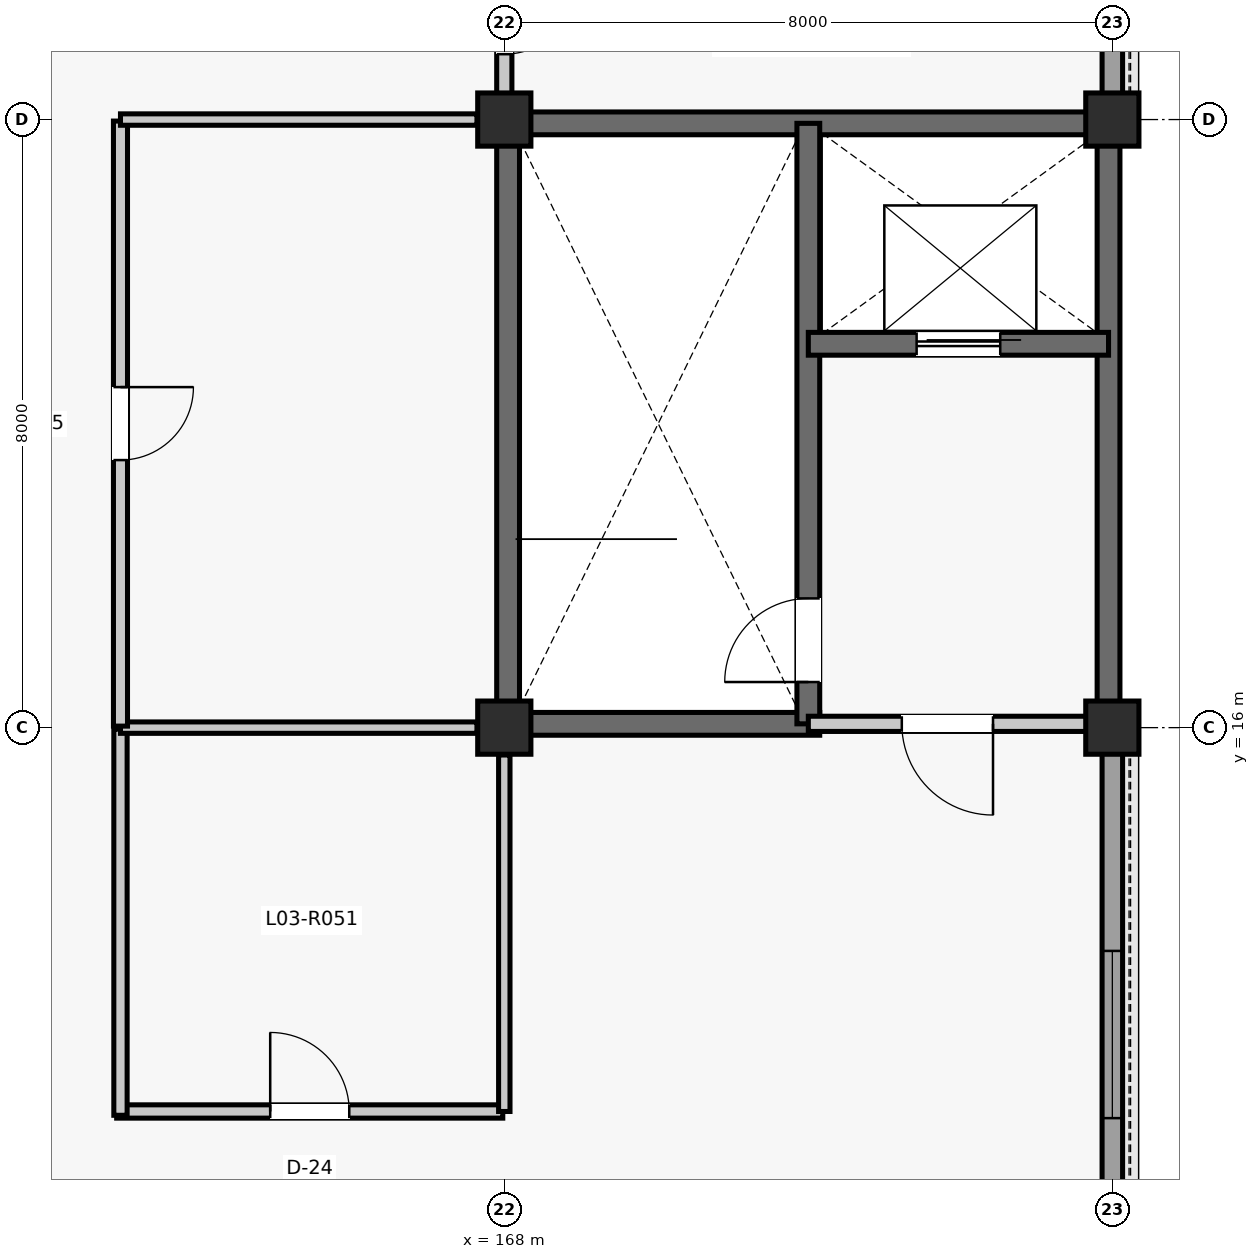
"""IFC4 building model, lengths in metres.
Left out: names, types, materials, properties, quantities, classifications, styles, units other than length and angle.
Written with IfcOpenShell. Run it as: python <this file> out.ifc"""

import sys

from ifc_helpers import new_model, si_unit, direction, frame, frame_2d, origin, origin_2d, place, context, subcontext, project, spatial, rectangle, extrude, element, fill, save


model = new_model("IFC4")
c1 = context("Model", 3, precision=1e-05, world=origin(), true_north=direction((0.0, 1.0)))
c2 = subcontext(c1, "Body", "Model", "MODEL_VIEW")
j1 = project(units=[si_unit("LENGTHUNIT", "METRE"), si_unit("PLANEANGLEUNIT", "RADIAN")], contexts=[c1])
p1 = place(None, origin())
s1 = spatial("IfcSite", under=j1, at=p1, CompositionType="ELEMENT")
p2 = place(p1, origin())
s2 = spatial("IfcBuilding", under=s1, at=p2, CompositionType="ELEMENT")
p3 = place(p2, frame((0.0, 0.0, 13.86)))
s3 = spatial("IfcBuildingStorey", under=s2, at=p3, CompositionType="ELEMENT", Elevation=13.86)
for number, where, z_axis, x_axis in (
    (1, (168.0, 16.0, 0.0), (0.0, 0.0, 1.0), (1.0, 0.0, 0.0)),
    (2, (168.0, 24.0, 0.0), (0.0, 0.0, 1.0), (1.0, 0.0, 0.0)),
    (3, (176.0, 16.0, 0.0), (0.0, 0.0, 1.0), (1.0, 0.0, 0.0)),
    (4, (176.0, 24.0, 0.0), (0.0, 0.0, 1.0), (1.0, 0.0, 0.0)),
):
    element("IfcColumn", number, at=place(p3, frame(where, z_axis=z_axis, x_axis=x_axis)), inside=s3, PredefinedType="COLUMN", context=c2, shape_type="SweptSolid", body=[
        extrude(rectangle(XDim=0.7, YDim=0.7, at=origin_2d()), origin(), (0.0, 0.0, 1.0), 3.96),
    ])
p4 = place(p3, frame((176.0, 8.26, 0.0), z_axis=(0.0, 0.0, 1.0), x_axis=(0.0, 1.0, 0.0)))
e5 = element("IfcWall", 5, at=p4, inside=s3, PredefinedType="SOLIDWALL", context=c2, shape_type="SweptSolid", body=[
    extrude(rectangle(XDim=7.405, YDim=0.27, at=frame_2d((3.703, 0.0))), origin(), (0.0, 0.0, 1.0), 3.299),
])
p5 = place(p4, frame((2.603, 0.0, 1.35)))
e6 = element("IfcOpeningElement", 6, at=p5, cuts=e5, PredefinedType="OPENING", context=c2, shape_type="SweptSolid", body=[
    extrude(rectangle(XDim=2.2, YDim=1.3, at=frame_2d((1.1, 0.65))), frame((0.0, 0.145, 0.0), z_axis=(0.0, -1.0, 0.0), x_axis=(1.0, 0.0, 0.0)), (0.0, 0.0, 1.0), 0.29),
])
p6 = place(p3, frame((176.0, 24.335, 0.0), z_axis=(0.0, 0.0, 1.0), x_axis=(0.0, 1.0, 0.0)))
e7 = element("IfcWall", 7, at=p6, inside=s3, PredefinedType="SOLIDWALL", context=c2, shape_type="SweptSolid", body=[
    extrude(rectangle(XDim=7.405, YDim=0.27, at=frame_2d((3.703, 0.0))), origin(), (0.0, 0.0, 1.0), 3.295),
])
p7 = place(p6, frame((2.603, 0.0, 1.35)))
e8 = element("IfcOpeningElement", 8, at=p7, cuts=e7, PredefinedType="OPENING", context=c2, shape_type="SweptSolid", body=[
    extrude(rectangle(XDim=2.2, YDim=1.3, at=frame_2d((1.1, 0.65))), frame((0.0, 0.145, 0.0), z_axis=(0.0, -1.0, 0.0), x_axis=(1.0, 0.0, 0.0)), (0.0, 0.0, 1.0), 0.29),
])
for number, where, z_axis, x_axis in (
    (9, (168.05, 16.24, 0.0), (0.0, 0.0, 1.0), (0.0, 1.0, 0.0)),
    (10, (168.24, 23.95, 0.0), (0.0, 0.0, 1.0), (1.0, 0.0, 0.0)),
    (11, (175.95, 16.24, 0.0), (0.0, 0.0, 1.0), (0.0, 1.0, 0.0)),
):
    element("IfcWall", number, at=place(p3, frame(where, z_axis=z_axis, x_axis=x_axis)), inside=s3, PredefinedType="SHEAR", context=c2, shape_type="SweptSolid", body=[
        extrude(rectangle(XDim=7.52, YDim=0.3, at=frame_2d((3.76, 0.0))), origin(), (0.0, 0.0, 1.0), 3.725),
    ])
p8 = place(p3, frame((168.24, 16.05, 0.0), z_axis=(0.0, 0.0, 1.0), x_axis=(1.0, 0.0, 0.0)))
e12 = element("IfcWall", 12, at=p8, inside=s3, PredefinedType="SHEAR", context=c2, shape_type="SweptSolid", body=[
    extrude(rectangle(XDim=3.91, YDim=0.3, at=frame_2d((1.955, 0.0))), origin(), (0.0, 0.0, 1.0), 3.725),
])
p9 = place(p3, frame((172.0, 16.05, 0.0), z_axis=(0.0, 0.0, 1.0), x_axis=(0.0, 1.0, 0.0)))
e13 = element("IfcWall", 13, at=p9, inside=s3, PredefinedType="SHEAR", context=c2, shape_type="SweptSolid", body=[
    extrude(rectangle(XDim=7.9, YDim=0.3, at=frame_2d((3.95, 0.0))), origin(), (0.0, 0.0, 1.0), 3.725),
])
p10 = place(p9, frame((0.55, 0.0, 0.0)))
e14 = element("IfcOpeningElement", 14, at=p10, cuts=e13, PredefinedType="OPENING", context=c2, shape_type="SweptSolid", body=[
    extrude(rectangle(XDim=1.1, YDim=2.15, at=frame_2d((0.55, 1.075))), frame((0.0, 0.16, 0.0), z_axis=(0.0, -1.0, 0.0), x_axis=(1.0, 0.0, 0.0)), (0.0, 0.0, 1.0), 0.32),
])
p11 = place(p3, frame((172.0, 21.05, 0.0), z_axis=(0.0, 0.0, 1.0), x_axis=(1.0, 0.0, 0.0)))
e15 = element("IfcWall", 15, at=p11, inside=s3, PredefinedType="SHEAR", context=c2, shape_type="SweptSolid", body=[
    extrude(rectangle(XDim=3.95, YDim=0.3, at=frame_2d((1.975, 0.0))), origin(), (0.0, 0.0, 1.0), 3.725),
])
p12 = place(p11, frame((1.425, 0.0, 0.0)))
e16 = element("IfcOpeningElement", 16, at=p12, cuts=e15, PredefinedType="OPENING", context=c2, shape_type="SweptSolid", body=[
    extrude(rectangle(XDim=1.1, YDim=2.2, at=frame_2d((0.55, 1.1))), frame((0.0, 0.16, 0.0), z_axis=(0.0, -1.0, 0.0), x_axis=(1.0, 0.0, 0.0)), (0.0, 0.0, 1.0), 0.32),
])
p13 = place(p3, frame((172.0, 16.05, 0.0), z_axis=(0.0, 0.0, 1.0), x_axis=(1.0, 0.0, 0.0)))
e17 = element("IfcWall", 17, at=p13, inside=s3, PredefinedType="PARTITIONING", context=c2, shape_type="SweptSolid", body=[
    extrude(rectangle(XDim=3.66, YDim=0.2, at=frame_2d((1.83, 0.0))), origin(), (0.0, 0.0, 1.0), 3.447),
])
p14 = place(p13, frame((1.23, 0.0, 0.0)))
e18 = element("IfcOpeningElement", 18, at=p14, cuts=e17, PredefinedType="OPENING", context=c2, shape_type="SweptSolid", body=[
    extrude(rectangle(XDim=1.2, YDim=2.15, at=frame_2d((0.6, 1.075))), frame((0.0, 0.11, 0.0), z_axis=(0.0, -1.0, 0.0), x_axis=(1.0, 0.0, 0.0)), (0.0, 0.0, 1.0), 0.22),
])
p15 = place(p3, frame((162.9, 10.95, 0.0), z_axis=(0.0, 0.0, 1.0), x_axis=(1.0, 0.0, 0.0)))
e19 = element("IfcWall", 19, at=p15, inside=s3, PredefinedType="PARTITIONING", context=c2, shape_type="SweptSolid", body=[
    extrude(rectangle(XDim=5.08, YDim=0.175, at=frame_2d((2.54, 0.0))), origin(), (0.0, 0.0, 1.0), 3.248),
])
p16 = place(p15, frame((2.02, 0.0, 0.0)))
e20 = element("IfcOpeningElement", 20, at=p16, cuts=e19, PredefinedType="OPENING", context=c2, shape_type="SweptSolid", body=[
    extrude(rectangle(XDim=1.04, YDim=2.18, at=frame_2d((0.52, 1.09))), frame((0.0, 0.097, 0.0), z_axis=(0.0, -1.0, 0.0), x_axis=(1.0, 0.0, 0.0)), (0.0, 0.0, 1.0), 0.195),
])
p17 = place(p3, frame((162.95, 10.9, 0.0), z_axis=(0.0, 0.0, 1.0), x_axis=(0.0, 1.0, 0.0)))
e21 = element("IfcWall", 21, at=p17, inside=s3, PredefinedType="PARTITIONING", context=c2, shape_type="SweptSolid", body=[
    extrude(rectangle(XDim=5.08, YDim=0.175, at=frame_2d((2.54, 0.0))), origin(), (0.0, 0.0, 1.0), 3.236),
])
p18 = place(p3, frame((162.95, 16.0, 0.0), z_axis=(0.0, 0.0, 1.0), x_axis=(1.0, 0.0, 0.0)))
e22 = element("IfcWall", 22, at=p18, inside=s3, PredefinedType="PARTITIONING", context=c2, shape_type="SweptSolid", body=[
    extrude(rectangle(XDim=4.69, YDim=0.15, at=frame_2d((2.345, 0.0))), origin(), (0.0, 0.0, 1.0), 3.236),
])
p19 = place(p3, frame((168.0, 10.95, 0.0), z_axis=(0.0, 0.0, 1.0), x_axis=(0.0, 1.0, 0.0)))
e23 = element("IfcWall", 23, at=p19, inside=s3, PredefinedType="PARTITIONING", context=c2, shape_type="SweptSolid", body=[
    extrude(rectangle(XDim=4.69, YDim=0.15, at=frame_2d((2.345, 0.0))), origin(), (0.0, 0.0, 1.0), 3.248),
])
p20 = place(p3, frame((162.95, 16.02, 0.0), z_axis=(0.0, 0.0, 1.0), x_axis=(0.0, 1.0, 0.0)))
e24 = element("IfcWall", 24, at=p20, inside=s3, PredefinedType="PARTITIONING", context=c2, shape_type="SweptSolid", body=[
    extrude(rectangle(XDim=7.96, YDim=0.185, at=frame_2d((3.98, 0.0))), origin(), (0.0, 0.0, 1.0), 3.236),
])
p21 = place(p20, frame((3.5, 0.0, 0.0)))
e25 = element("IfcOpeningElement", 25, at=p21, cuts=e24, PredefinedType="OPENING", context=c2, shape_type="SweptSolid", body=[
    extrude(rectangle(XDim=0.96, YDim=2.14, at=frame_2d((0.48, 1.07))), frame((0.0, 0.103, 0.0), z_axis=(0.0, -1.0, 0.0), x_axis=(1.0, 0.0, 0.0)), (0.0, 0.0, 1.0), 0.205),
])
p22 = place(p3, frame((162.95, 24.0, 0.0), z_axis=(0.0, 0.0, 1.0), x_axis=(1.0, 0.0, 0.0)))
e26 = element("IfcWall", 26, at=p22, inside=s3, PredefinedType="PARTITIONING", context=c2, shape_type="SweptSolid", body=[
    extrude(rectangle(XDim=4.69, YDim=0.15, at=frame_2d((2.345, 0.0))), origin(), (0.0, 0.0, 1.0), 3.447),
])
p23 = place(p3, frame((168.0, 24.34, 0.0), z_axis=(0.0, 0.0, 1.0), x_axis=(0.0, 1.0, 0.0)))
e27 = element("IfcWall", 27, at=p23, inside=s3, PredefinedType="PARTITIONING", context=c2, shape_type="SweptSolid", body=[
    extrude(rectangle(XDim=7.395, YDim=0.2, at=frame_2d((3.698, 0.0))), origin(), (0.0, 0.0, 1.0), 3.242),
])
p24 = place(p23, frame((0.52, 0.0, 0.0)))
e28 = element("IfcOpeningElement", 28, at=p24, cuts=e27, PredefinedType="OPENING", context=c2, shape_type="SweptSolid", body=[
    extrude(rectangle(XDim=0.94, YDim=2.12, at=frame_2d((0.47, 1.06))), frame((0.0, 0.11, 0.0), z_axis=(0.0, -1.0, 0.0), x_axis=(1.0, 0.0, 0.0)), (0.0, 0.0, 1.0), 0.22),
])
p25 = place(p5, origin())
e29 = element("IfcWindow", 29, at=p25, inside=s3, PartitioningType="SINGLE_PANEL", PredefinedType="WINDOW", context=c2, shape_type="SweptSolid", body=[
    extrude(rectangle(XDim=2.2, YDim=1.3, at=frame_2d((1.1, 0.65))), frame((0.0, 0.03, 0.0), z_axis=(0.0, -1.0, 0.0), x_axis=(1.0, 0.0, 0.0)), (0.0, 0.0, 1.0), 0.06),
])
fill(e6, e29)
p26 = place(p10, origin())
e30 = element("IfcDoor", 30, at=p26, inside=s3, OperationType="SINGLE_SWING_LEFT", PredefinedType="DOOR", context=c2, shape_type="SweptSolid", body=[
    extrude(rectangle(XDim=1.1, YDim=2.15, at=frame_2d((0.55, 1.075))), frame((0.0, 0.025, 0.0), z_axis=(0.0, -1.0, 0.0), x_axis=(1.0, 0.0, 0.0)), (0.0, 0.0, 1.0), 0.05),
])
fill(e14, e30)
p27 = place(p12, origin())
e31 = element("IfcDoor", 31, at=p27, inside=s3, OperationType="SLIDING_TO_LEFT", PredefinedType="DOOR", context=c2, shape_type="SweptSolid", body=[
    extrude(rectangle(XDim=1.1, YDim=2.2, at=frame_2d((0.55, 1.1))), frame((0.0, 0.025, 0.0), z_axis=(0.0, -1.0, 0.0), x_axis=(1.0, 0.0, 0.0)), (0.0, 0.0, 1.0), 0.05),
])
fill(e16, e31)
p28 = place(p14, frame((1.2, 0.0, 0.0), z_axis=(0.0, 0.0, 1.0), x_axis=(-1.0, 0.0, 0.0)))
e32 = element("IfcDoor", 32, at=p28, inside=s3, OperationType="SINGLE_SWING_RIGHT", PredefinedType="DOOR", context=c2, shape_type="SweptSolid", body=[
    extrude(rectangle(XDim=1.2, YDim=2.15, at=frame_2d((0.6, 1.075))), frame((0.0, 0.025, 0.0), z_axis=(0.0, -1.0, 0.0), x_axis=(1.0, 0.0, 0.0)), (0.0, 0.0, 1.0), 0.05),
])
fill(e18, e32)
p29 = place(p16, origin())
e33 = element("IfcDoor", 33, at=p29, inside=s3, OperationType="SINGLE_SWING_LEFT", PredefinedType="DOOR", context=c2, shape_type="SweptSolid", body=[
    extrude(rectangle(XDim=1.04, YDim=2.18, at=frame_2d((0.52, 1.09))), frame((0.0, 0.025, 0.0), z_axis=(0.0, -1.0, 0.0), x_axis=(1.0, 0.0, 0.0)), (0.0, 0.0, 1.0), 0.05),
])
fill(e20, e33)
p30 = place(p21, frame((0.96, 0.0, 0.0), z_axis=(0.0, 0.0, 1.0), x_axis=(-1.0, 0.0, 0.0)))
e34 = element("IfcDoor", 34, at=p30, inside=s3, OperationType="SINGLE_SWING_RIGHT", PredefinedType="DOOR", context=c2, shape_type="SweptSolid", body=[
    extrude(rectangle(XDim=0.96, YDim=2.14, at=frame_2d((0.48, 1.07))), frame((0.0, 0.025, 0.0), z_axis=(0.0, -1.0, 0.0), x_axis=(1.0, 0.0, 0.0)), (0.0, 0.0, 1.0), 0.05),
])
fill(e25, e34)
p31 = place(p24, frame((0.94, 0.0, 0.0), z_axis=(0.0, 0.0, 1.0), x_axis=(-1.0, 0.0, 0.0)))
e35 = element("IfcDoor", 35, at=p31, inside=s3, OperationType="SINGLE_SWING_RIGHT", PredefinedType="DOOR", context=c2, shape_type="SweptSolid", body=[
    extrude(rectangle(XDim=0.94, YDim=2.12, at=frame_2d((0.47, 1.06))), frame((0.0, 0.025, 0.0), z_axis=(0.0, -1.0, 0.0), x_axis=(1.0, 0.0, 0.0)), (0.0, 0.0, 1.0), 0.05),
])
fill(e28, e35)
save(model, sys.argv[1])
